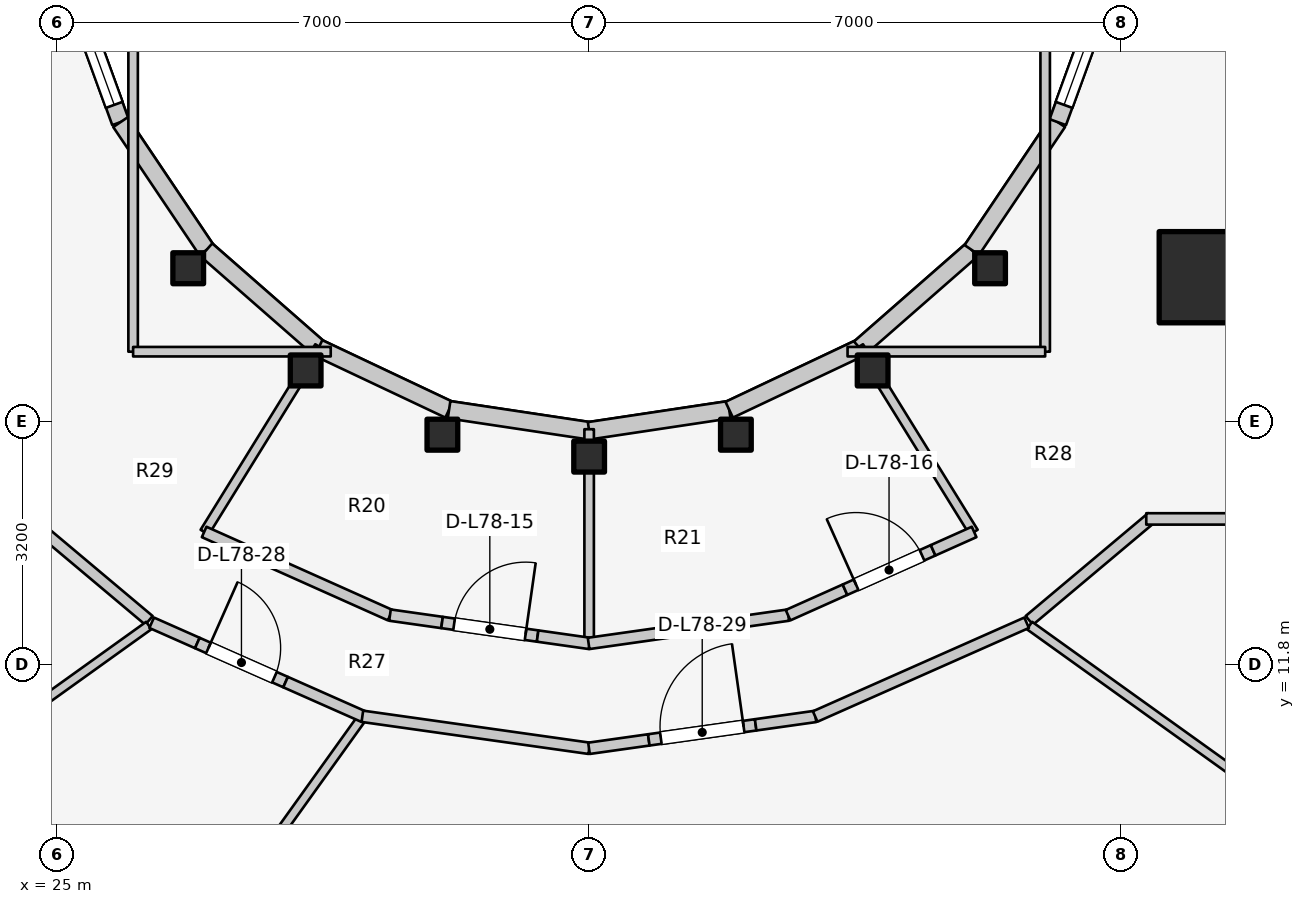
"""IFC4 building model, lengths in metres.
Left out: names, types, materials, properties, quantities, classifications, styles, units other than length and angle.
Written with IfcOpenShell. Run it as: python <this file> out.ifc"""

import sys

from ifc_helpers import new_model, si_unit, direction, frame, frame_2d, origin, origin_2d, place, context, subcontext, project, spatial, rectangle, i_section, extrude, element, fill, save


model = new_model("IFC4")
c1 = context("Model", 3, precision=1e-05, world=origin(), true_north=direction((0.0, 1.0)))
c2 = subcontext(c1, "Body", "Model", "MODEL_VIEW")
j1 = project(units=[si_unit("LENGTHUNIT", "METRE"), si_unit("PLANEANGLEUNIT", "RADIAN")], contexts=[c1])
p1 = place(None, origin())
s1 = spatial("IfcSite", under=j1, at=p1, CompositionType="ELEMENT")
p2 = place(p1, origin())
s2 = spatial("IfcBuilding", under=s1, at=p2, CompositionType="ELEMENT")
p3 = place(p2, frame((0.0, 0.0, 256.8)))
s3 = spatial("IfcBuildingStorey", under=s2, at=p3, CompositionType="ELEMENT", Elevation=256.8)
p4 = place(p3, frame((39.85, 16.55, 0.0), z_axis=(0.0, 0.0, 1.0), x_axis=(1.0, 0.0, 0.0)))
e1 = element("IfcWall", 1, at=p4, inside=s3, PredefinedType="SHEAR", context=c2, shape_type="SweptSolid", body=[
    extrude(rectangle(XDim=4.5, YDim=0.45, at=frame_2d((2.25, 0.0))), origin(), (0.0, 0.0, 1.0), 3.6),
])
p5 = place(p3, frame((40.1, 16.9, 0.0), z_axis=(0.0, 0.0, 1.0), x_axis=(1.0, 0.0, 0.0)))
e2 = element("IfcColumn", 2, at=p5, inside=s3, PredefinedType="COLUMN", context=c2, shape_type="SweptSolid", body=[
    extrude(rectangle(XDim=1.2, YDim=1.2, at=origin_2d()), origin(), (0.0, 0.0, 1.0), 3.6),
])
for number, where, z_axis, x_axis in (
    (3, (26.725, 17.018, 0.0), (0.0, 0.0, 1.0), (1.0, 0.0, 0.0)),
    (4, (28.27, 15.673, 0.0), (0.0, 0.0, 1.0), (1.0, 0.0, 0.0)),
    (5, (30.069, 14.828, 0.0), (0.0, 0.0, 1.0), (1.0, 0.0, 0.0)),
    (6, (32.0, 14.54, 0.0), (0.0, 0.0, 1.0), (1.0, 0.0, 0.0)),
    (7, (33.931, 14.828, 0.0), (0.0, 0.0, 1.0), (1.0, 0.0, 0.0)),
    (8, (35.73, 15.673, 0.0), (0.0, 0.0, 1.0), (1.0, 0.0, 0.0)),
    (9, (37.275, 17.018, 0.0), (0.0, 0.0, 1.0), (1.0, 0.0, 0.0)),
):
    element("IfcColumn", number, at=place(p3, frame(where, z_axis=z_axis, x_axis=x_axis)), inside=s3, PredefinedType="COLUMN", context=c2, shape_type="SweptSolid", body=[
        extrude(i_section(OverallWidth=0.404, OverallDepth=0.407, WebThickness=0.027, FlangeThickness=0.044, FilletRadius=0.025, at=origin_2d()), origin(), (0.0, 0.0, 1.0), 3.6),
    ])
p6 = place(p3, frame((25.123, 20.898, 0.0), z_axis=(0.0, 0.0, 1.0), x_axis=(0.341423187295, -0.93990968033, 0.0)))
e10 = element("IfcWall", 10, at=p6, inside=s3, PredefinedType="STANDARD", context=c2, shape_type="SweptSolid", body=[
    extrude(rectangle(XDim=2.084, YDim=0.23, at=frame_2d((1.042, 0.0))), origin(), (0.0, 0.0, 1.0), 3.06),
])
p7 = place(p6, frame((0.242, 0.0, 0.85)))
e11 = element("IfcOpeningElement", 11, at=p7, cuts=e10, PredefinedType="OPENING", context=c2, shape_type="SweptSolid", body=[
    extrude(rectangle(XDim=1.6, YDim=1.65, at=frame_2d((0.8, 0.825))), frame((0.0, 0.125, 0.0), z_axis=(0.0, -1.0, 0.0), x_axis=(1.0, 0.0, 0.0)), (0.0, 0.0, 1.0), 0.25),
])
p8 = place(p3, frame((25.834, 18.94, 0.0), z_axis=(0.0, 0.0, 1.0), x_axis=(0.558197800898, -0.829707909492, 0.0)))
e12 = element("IfcWall", 12, at=p8, inside=s3, PredefinedType="STANDARD", context=c2, shape_type="SweptSolid", body=[
    extrude(rectangle(XDim=2.027, YDim=0.23, at=frame_2d((1.013, 0.0))), origin(), (0.0, 0.0, 1.0), 1.72),
])
p9 = place(p3, frame((26.965, 17.258, 0.0), z_axis=(0.0, 0.0, 1.0), x_axis=(0.752576694707, -0.658504607869, 0.0)))
e13 = element("IfcWall", 13, at=p9, inside=s3, PredefinedType="STANDARD", context=c2, shape_type="SweptSolid", body=[
    extrude(rectangle(XDim=1.959, YDim=0.23, at=frame_2d((0.98, 0.0))), origin(), (0.0, 0.0, 1.0), 1.72),
])
p10 = place(p3, frame((28.44, 15.968, 0.0), z_axis=(0.0, 0.0, 1.0), x_axis=(0.904179699603, -0.427152280606, 0.0)))
e14 = element("IfcWall", 14, at=p10, inside=s3, PredefinedType="STANDARD", context=c2, shape_type="SweptSolid", body=[
    extrude(rectangle(XDim=1.899, YDim=0.23, at=frame_2d((0.95, 0.0))), origin(), (0.0, 0.0, 1.0), 1.72),
])
for number, where, z_axis, x_axis in (
    (15, (30.157, 15.157, 0.0), (0.0, 0.0, 1.0), (0.989, -0.149, 0.0)),
    (16, (32.0, 14.88, 0.0), (0.0, 0.0, 1.0), (0.989, 0.149, 0.0)),
):
    element("IfcWall", number, at=place(p3, frame(where, z_axis=z_axis, x_axis=x_axis)), inside=s3, PredefinedType="STANDARD", context=c2, shape_type="SweptSolid", body=[
        extrude(rectangle(XDim=1.864, YDim=0.23, at=frame_2d((0.932, 0.0))), origin(), (0.0, 0.0, 1.0), 1.72),
    ])
p11 = place(p3, frame((33.843, 15.157, 0.0), z_axis=(0.0, 0.0, 1.0), x_axis=(0.904179699603, 0.427152280606, 0.0)))
e17 = element("IfcWall", 17, at=p11, inside=s3, PredefinedType="STANDARD", context=c2, shape_type="SweptSolid", body=[
    extrude(rectangle(XDim=1.899, YDim=0.23, at=frame_2d((0.95, 0.0))), origin(), (0.0, 0.0, 1.0), 1.72),
])
p12 = place(p3, frame((35.56, 15.968, 0.0), z_axis=(0.0, 0.0, 1.0), x_axis=(0.752576694707, 0.658504607869, 0.0)))
e18 = element("IfcWall", 18, at=p12, inside=s3, PredefinedType="STANDARD", context=c2, shape_type="SweptSolid", body=[
    extrude(rectangle(XDim=1.959, YDim=0.23, at=frame_2d((0.98, 0.0))), origin(), (0.0, 0.0, 1.0), 1.72),
])
p13 = place(p3, frame((37.035, 17.258, 0.0), z_axis=(0.0, 0.0, 1.0), x_axis=(0.558197800898, 0.829707909492, 0.0)))
e19 = element("IfcWall", 19, at=p13, inside=s3, PredefinedType="STANDARD", context=c2, shape_type="SweptSolid", body=[
    extrude(rectangle(XDim=2.027, YDim=0.23, at=frame_2d((1.013, 0.0))), origin(), (0.0, 0.0, 1.0), 1.72),
])
p14 = place(p3, frame((38.166, 18.94, 0.0), z_axis=(0.0, 0.0, 1.0), x_axis=(0.341423187295, 0.93990968033, 0.0)))
e20 = element("IfcWall", 20, at=p14, inside=s3, PredefinedType="STANDARD", context=c2, shape_type="SweptSolid", body=[
    extrude(rectangle(XDim=2.084, YDim=0.23, at=frame_2d((1.042, 0.0))), origin(), (0.0, 0.0, 1.0), 3.06),
])
p15 = place(p14, frame((0.242, 0.0, 0.85)))
e21 = element("IfcOpeningElement", 21, at=p15, cuts=e20, PredefinedType="OPENING", context=c2, shape_type="SweptSolid", body=[
    extrude(rectangle(XDim=1.6, YDim=1.65, at=frame_2d((0.8, 0.825))), frame((0.0, 0.125, 0.0), z_axis=(0.0, -1.0, 0.0), x_axis=(1.0, 0.0, 0.0)), (0.0, 0.0, 1.0), 0.25),
])
p16 = place(p3, frame((28.45, 15.985, 0.0), z_axis=(0.0, 0.0, 1.0), x_axis=(-0.52592395012, -0.850531597702, 0.0)))
e22 = element("IfcWall", 22, at=p16, inside=s3, PredefinedType="PARTITIONING", context=c2, shape_type="SweptSolid", body=[
    extrude(rectangle(XDim=2.869, YDim=0.125, at=frame_2d((1.435, 0.0))), origin(), (0.0, 0.0, 1.0), 1.72),
])
p17 = place(p3, frame((32.0, 14.9, 0.0), z_axis=(0.0, 0.0, 1.0), x_axis=(0.0, -1.0, 0.0)))
e23 = element("IfcWall", 23, at=p17, inside=s3, PredefinedType="PARTITIONING", context=c2, shape_type="SweptSolid", body=[
    extrude(rectangle(XDim=2.818, YDim=0.125, at=frame_2d((1.409, 0.0))), origin(), (0.0, 0.0, 1.0), 1.72),
])
p18 = place(p3, frame((35.55, 15.985, 0.0), z_axis=(0.0, 0.0, 1.0), x_axis=(0.52592395012, -0.850531597702, 0.0)))
e24 = element("IfcWall", 24, at=p18, inside=s3, PredefinedType="PARTITIONING", context=c2, shape_type="SweptSolid", body=[
    extrude(rectangle(XDim=2.869, YDim=0.125, at=frame_2d((1.435, 0.0))), origin(), (0.0, 0.0, 1.0), 1.72),
])
p19 = place(p3, frame((26.935, 13.549, 0.0), z_axis=(0.0, 0.0, 1.0), x_axis=(0.912859324183, -0.408274239027, 0.0)))
e25 = element("IfcWall", 25, at=p19, inside=s3, PredefinedType="PARTITIONING", context=c2, shape_type="SweptSolid", body=[
    extrude(rectangle(XDim=2.682, YDim=0.15, at=frame_2d((1.341, 0.0))), origin(), (0.0, 0.0, 1.0), 1.72),
])
p20 = place(p3, frame((29.38, 12.455, 0.0), z_axis=(0.0, 0.0, 1.0), x_axis=(0.990090139669, -0.140433312754, 0.0)))
e26 = element("IfcWall", 26, at=p20, inside=s3, PredefinedType="PARTITIONING", context=c2, shape_type="SweptSolid", body=[
    extrude(rectangle(XDim=0.692, YDim=0.15, at=frame_2d((0.346, 0.0))), origin(), (0.0, 0.0, 1.0), 1.72),
])
p21 = place(p3, frame((30.065, 12.357, 0.0), z_axis=(0.0, 0.0, 1.0), x_axis=(0.990102710588, -0.140344656064, 0.0)))
e27 = element("IfcWall", 27, at=p21, inside=s3, PredefinedType="PARTITIONING", context=c2, shape_type="SweptSolid", body=[
    extrude(rectangle(XDim=1.27, YDim=0.15, at=frame_2d((0.635, 0.0))), origin(), (0.0, 0.0, 1.0), 3.075),
])
p22 = place(p21, frame((0.16, 0.0, 0.0)))
e28 = element("IfcOpeningElement", 28, at=p22, cuts=e27, PredefinedType="OPENING", context=c2, shape_type="SweptSolid", body=[
    extrude(rectangle(XDim=0.95, YDim=2.1, at=frame_2d((0.475, 1.05))), frame((0.0, 0.085, 0.0), z_axis=(0.0, -1.0, 0.0), x_axis=(1.0, 0.0, 0.0)), (0.0, 0.0, 1.0), 0.17),
])
p23 = place(p3, frame((31.322, 12.179, 0.0), z_axis=(0.0, 0.0, 1.0), x_axis=(0.990090139669, -0.140433312754, 0.0)))
e29 = element("IfcWall", 29, at=p23, inside=s3, PredefinedType="PARTITIONING", context=c2, shape_type="SweptSolid", body=[
    extrude(rectangle(XDim=0.692, YDim=0.15, at=frame_2d((0.346, 0.0))), origin(), (0.0, 0.0, 1.0), 1.72),
])
p24 = place(p3, frame((31.993, 12.082, 0.0), z_axis=(0.0, 0.0, 1.0), x_axis=(0.990096156252, 0.140390887794, 0.0)))
e30 = element("IfcWall", 30, at=p24, inside=s3, PredefinedType="PARTITIONING", context=c2, shape_type="SweptSolid", body=[
    extrude(rectangle(XDim=2.654, YDim=0.15, at=frame_2d((1.327, 0.0))), origin(), (0.0, 0.0, 1.0), 1.72),
])
p25 = place(p3, frame((34.617, 12.454, 0.0), z_axis=(0.0, 0.0, 1.0), x_axis=(0.912926186948, 0.408124707883, 0.0)))
e31 = element("IfcWall", 31, at=p25, inside=s3, PredefinedType="PARTITIONING", context=c2, shape_type="SweptSolid", body=[
    extrude(rectangle(XDim=0.821, YDim=0.15, at=frame_2d((0.41, 0.0))), origin(), (0.0, 0.0, 1.0), 1.72),
])
p26 = place(p3, frame((35.366, 12.789, 0.0), z_axis=(0.0, 0.0, 1.0), x_axis=(0.912825795494, 0.408349197479, 0.0)))
e32 = element("IfcWall", 32, at=p26, inside=s3, PredefinedType="PARTITIONING", context=c2, shape_type="SweptSolid", body=[
    extrude(rectangle(XDim=1.27, YDim=0.15, at=frame_2d((0.635, 0.0))), origin(), (0.0, 0.0, 1.0), 2.16),
])
p27 = place(p26, frame((0.16, 0.0, 0.0)))
e33 = element("IfcOpeningElement", 33, at=p27, cuts=e32, PredefinedType="OPENING", context=c2, shape_type="SweptSolid", body=[
    extrude(rectangle(XDim=0.95, YDim=2.1, at=frame_2d((0.475, 1.05))), frame((0.0, 0.085, 0.0), z_axis=(0.0, -1.0, 0.0), x_axis=(1.0, 0.0, 0.0)), (0.0, 0.0, 1.0), 0.17),
])
p28 = place(p3, frame((36.525, 13.307, 0.0), z_axis=(0.0, 0.0, 1.0), x_axis=(0.912838500798, 0.408320794794, 0.0)))
e34 = element("IfcWall", 34, at=p28, inside=s3, PredefinedType="PARTITIONING", context=c2, shape_type="SweptSolid", body=[
    extrude(rectangle(XDim=0.591, YDim=0.15, at=frame_2d((0.296, 0.0))), origin(), (0.0, 0.0, 1.0), 3.075),
])
p29 = place(p3, frame((26.0, 15.92, 0.0), z_axis=(0.0, 0.0, 1.0), x_axis=(0.0, 1.0, 0.0)))
e35 = element("IfcWall", 35, at=p29, inside=s3, PredefinedType="PARTITIONING", context=c2, shape_type="SweptSolid", body=[
    extrude(rectangle(XDim=4.28, YDim=0.125, at=frame_2d((2.14, 0.0))), origin(), (0.0, 0.0, 1.0), 1.72),
])
p30 = place(p3, frame((26.0, 15.92, 0.0), z_axis=(0.0, 0.0, 1.0), x_axis=(1.0, 0.0, 0.0)))
e36 = element("IfcWall", 36, at=p30, inside=s3, PredefinedType="PARTITIONING", context=c2, shape_type="SweptSolid", body=[
    extrude(rectangle(XDim=2.6, YDim=0.125, at=frame_2d((1.3, 0.0))), origin(), (0.0, 0.0, 1.0), 1.72),
])
p31 = place(p3, frame((38.0, 15.92, 0.0), z_axis=(0.0, 0.0, 1.0), x_axis=(0.0, 1.0, 0.0)))
e37 = element("IfcWall", 37, at=p31, inside=s3, PredefinedType="PARTITIONING", context=c2, shape_type="SweptSolid", body=[
    extrude(rectangle(XDim=4.28, YDim=0.125, at=frame_2d((2.14, 0.0))), origin(), (0.0, 0.0, 1.0), 1.72),
])
p32 = place(p3, frame((35.4, 15.92, 0.0), z_axis=(0.0, 0.0, 1.0), x_axis=(1.0, 0.0, 0.0)))
e38 = element("IfcWall", 38, at=p32, inside=s3, PredefinedType="PARTITIONING", context=c2, shape_type="SweptSolid", body=[
    extrude(rectangle(XDim=2.6, YDim=0.125, at=frame_2d((1.3, 0.0))), origin(), (0.0, 0.0, 1.0), 1.72),
])
for number, where, z_axis, x_axis in (
    (39, (26.209, 12.385, 0.0), (0.0, 0.0, 1.0), (-0.766, 0.643, 0.0)),
    (40, (37.791, 12.385, 0.0), (0.0, 0.0, 1.0), (0.766, 0.643, 0.0)),
):
    element("IfcWall", number, at=place(p3, frame(where, z_axis=z_axis, x_axis=x_axis)), inside=s3, PredefinedType="PARTITIONING", context=c2, shape_type="SweptSolid", body=[
        extrude(rectangle(XDim=2.105, YDim=0.15, at=frame_2d((1.053, 0.0))), origin(), (0.0, 0.0, 1.0), 1.72),
    ])
p33 = place(p3, frame((39.33, 13.72, 0.0), z_axis=(0.0, 0.0, 1.0), x_axis=(1.0, 0.0, 0.0)))
e41 = element("IfcWall", 41, at=p33, inside=s3, PredefinedType="PARTITIONING", context=c2, shape_type="SweptSolid", body=[
    extrude(rectangle(XDim=5.06, YDim=0.15, at=frame_2d((2.53, 0.0))), origin(), (0.0, 0.0, 1.0), 1.72),
])
p34 = place(p3, frame((26.206, 12.318, 0.0), z_axis=(0.0, 0.0, 1.0), x_axis=(-0.812763742602, -0.582593424879, 0.0)))
e42 = element("IfcWall", 42, at=p34, inside=s3, PredefinedType="MOVABLE", context=c2, shape_type="SweptSolid", body=[
    extrude(rectangle(XDim=6.966, YDim=0.12, at=frame_2d((3.483, 0.0))), origin(), (0.0, 0.0, 1.0), 1.72),
])
p35 = place(p3, frame((28.992, 11.076, 0.0), z_axis=(0.0, 0.0, 1.0), x_axis=(-0.582726066442, -0.812668648029, 0.0)))
e43 = element("IfcWall", 43, at=p35, inside=s3, PredefinedType="MOVABLE", context=c2, shape_type="SweptSolid", body=[
    extrude(rectangle(XDim=6.515, YDim=0.12, at=frame_2d((3.257, 0.0))), origin(), (0.0, 0.0, 1.0), 1.72),
])
p36 = place(p3, frame((37.794, 12.318, 0.0), z_axis=(0.0, 0.0, 1.0), x_axis=(0.812763742602, -0.582593424879, 0.0)))
e44 = element("IfcWall", 44, at=p36, inside=s3, PredefinedType="MOVABLE", context=c2, shape_type="SweptSolid", body=[
    extrude(rectangle(XDim=6.966, YDim=0.12, at=frame_2d((3.483, 0.0))), origin(), (0.0, 0.0, 1.0), 1.72),
])
p37 = place(p3, frame((26.244, 12.354, 0.0), z_axis=(0.0, 0.0, 1.0), x_axis=(0.914255086823, -0.405139033194, 0.0)))
e45 = element("IfcWall", 45, at=p37, inside=s3, PredefinedType="PARTITIONING", context=c2, shape_type="SweptSolid", body=[
    extrude(rectangle(XDim=0.657, YDim=0.15, at=frame_2d((0.329, 0.0))), origin(), (0.0, 0.0, 1.0), 3.075),
])
p38 = place(p3, frame((26.845, 12.088, 0.0), z_axis=(0.0, 0.0, 1.0), x_axis=(0.914294474207, -0.405050138174, 0.0)))
e46 = element("IfcWall", 46, at=p38, inside=s3, PredefinedType="PARTITIONING", context=c2, shape_type="SweptSolid", body=[
    extrude(rectangle(XDim=1.27, YDim=0.15, at=frame_2d((0.635, 0.0))), origin(), (0.0, 0.0, 1.0), 2.16),
])
p39 = place(p38, frame((0.16, 0.0, 0.0)))
e47 = element("IfcOpeningElement", 47, at=p39, cuts=e46, PredefinedType="OPENING", context=c2, shape_type="SweptSolid", body=[
    extrude(rectangle(XDim=0.95, YDim=2.1, at=frame_2d((0.475, 1.05))), frame((0.0, 0.085, 0.0), z_axis=(0.0, -1.0, 0.0), x_axis=(1.0, 0.0, 0.0)), (0.0, 0.0, 1.0), 0.17),
])
p40 = place(p3, frame((28.006, 11.573, 0.0), z_axis=(0.0, 0.0, 1.0), x_axis=(0.914340182122, -0.404946948817, 0.0)))
e48 = element("IfcWall", 48, at=p40, inside=s3, PredefinedType="PARTITIONING", context=c2, shape_type="SweptSolid", body=[
    extrude(rectangle(XDim=1.122, YDim=0.15, at=frame_2d((0.561, 0.0))), origin(), (0.0, 0.0, 1.0), 1.72),
])
p41 = place(p3, frame((29.016, 11.123, 0.0), z_axis=(0.0, 0.0, 1.0), x_axis=(0.990186143936, -0.139754786527, 0.0)))
e49 = element("IfcWall", 49, at=p41, inside=s3, PredefinedType="PARTITIONING", context=c2, shape_type="SweptSolid", body=[
    extrude(rectangle(XDim=3.015, YDim=0.15, at=frame_2d((1.508, 0.0))), origin(), (0.0, 0.0, 1.0), 1.72),
])
p42 = place(p3, frame((31.998, 10.702, 0.0), z_axis=(0.0, 0.0, 1.0), x_axis=(0.990224114478, 0.139485494252, 0.0)))
e50 = element("IfcWall", 50, at=p42, inside=s3, PredefinedType="PARTITIONING", context=c2, shape_type="SweptSolid", body=[
    extrude(rectangle(XDim=0.795, YDim=0.15, at=frame_2d((0.397, 0.0))), origin(), (0.0, 0.0, 1.0), 1.72),
])
p43 = place(p3, frame((32.785, 10.813, 0.0), z_axis=(0.0, 0.0, 1.0), x_axis=(0.990229514994, 0.139447149967, 0.0)))
e51 = element("IfcWall", 51, at=p43, inside=s3, PredefinedType="PARTITIONING", context=c2, shape_type="SweptSolid", body=[
    extrude(rectangle(XDim=1.42, YDim=0.15, at=frame_2d((0.71, 0.0))), origin(), (0.0, 0.0, 1.0), 3.075),
])
p44 = place(p43, frame((0.16, 0.0, 0.0)))
e52 = element("IfcOpeningElement", 52, at=p44, cuts=e51, PredefinedType="OPENING", context=c2, shape_type="SweptSolid", body=[
    extrude(rectangle(XDim=1.1, YDim=2.1, at=frame_2d((0.55, 1.05))), frame((0.0, 0.085, 0.0), z_axis=(0.0, -1.0, 0.0), x_axis=(1.0, 0.0, 0.0)), (0.0, 0.0, 1.0), 0.17),
])
p45 = place(p3, frame((34.191, 11.011, 0.0), z_axis=(0.0, 0.0, 1.0), x_axis=(0.990224114478, 0.139485494252, 0.0)))
e53 = element("IfcWall", 53, at=p45, inside=s3, PredefinedType="PARTITIONING", context=c2, shape_type="SweptSolid", body=[
    extrude(rectangle(XDim=0.795, YDim=0.15, at=frame_2d((0.397, 0.0))), origin(), (0.0, 0.0, 1.0), 3.075),
])
p46 = place(p3, frame((34.974, 11.121, 0.0), z_axis=(0.0, 0.0, 1.0), x_axis=(0.914181699255, 0.405304602425, 0.0)))
e54 = element("IfcWall", 54, at=p46, inside=s3, PredefinedType="PARTITIONING", context=c2, shape_type="SweptSolid", body=[
    extrude(rectangle(XDim=3.043, YDim=0.15, at=frame_2d((1.521, 0.0))), origin(), (0.0, 0.0, 1.0), 1.72),
])
p47 = place(p7, origin())
e55 = element("IfcWindow", 55, at=p47, inside=s3, PartitioningType="SINGLE_PANEL", PredefinedType="WINDOW", context=c2, shape_type="SweptSolid", body=[
    extrude(rectangle(XDim=1.6, YDim=1.65, at=frame_2d((0.8, 0.825))), frame((0.0, 0.03, 0.0), z_axis=(0.0, -1.0, 0.0), x_axis=(1.0, 0.0, 0.0)), (0.0, 0.0, 1.0), 0.06),
])
fill(e11, e55)
p48 = place(p15, origin())
e56 = element("IfcWindow", 56, at=p48, inside=s3, PartitioningType="SINGLE_PANEL", PredefinedType="WINDOW", context=c2, shape_type="SweptSolid", body=[
    extrude(rectangle(XDim=1.6, YDim=1.65, at=frame_2d((0.8, 0.825))), frame((0.0, 0.03, 0.0), z_axis=(0.0, -1.0, 0.0), x_axis=(1.0, 0.0, 0.0)), (0.0, 0.0, 1.0), 0.06),
])
fill(e21, e56)
p49 = place(p22, origin())
e57 = element("IfcDoor", 57, at=p49, inside=s3, OperationType="SINGLE_SWING_RIGHT", PredefinedType="DOOR", context=c2, shape_type="SweptSolid", body=[
    extrude(rectangle(XDim=0.95, YDim=2.1, at=frame_2d((0.475, 1.05))), frame((0.0, 0.025, 0.0), z_axis=(0.0, -1.0, 0.0), x_axis=(1.0, 0.0, 0.0)), (0.0, 0.0, 1.0), 0.05),
])
fill(e28, e57)
p50 = place(p27, origin())
e58 = element("IfcDoor", 58, at=p50, inside=s3, OperationType="SINGLE_SWING_LEFT", PredefinedType="DOOR", context=c2, shape_type="SweptSolid", body=[
    extrude(rectangle(XDim=0.95, YDim=2.1, at=frame_2d((0.475, 1.05))), frame((0.0, 0.025, 0.0), z_axis=(0.0, -1.0, 0.0), x_axis=(1.0, 0.0, 0.0)), (0.0, 0.0, 1.0), 0.05),
])
fill(e33, e58)
p51 = place(p39, origin())
e59 = element("IfcDoor", 59, at=p51, inside=s3, OperationType="SINGLE_SWING_LEFT", PredefinedType="DOOR", context=c2, shape_type="SweptSolid", body=[
    extrude(rectangle(XDim=0.95, YDim=2.1, at=frame_2d((0.475, 1.05))), frame((0.0, 0.025, 0.0), z_axis=(0.0, -1.0, 0.0), x_axis=(1.0, 0.0, 0.0)), (0.0, 0.0, 1.0), 0.05),
])
fill(e47, e59)
p52 = place(p44, origin())
e60 = element("IfcDoor", 60, at=p52, inside=s3, OperationType="SINGLE_SWING_RIGHT", PredefinedType="DOOR", context=c2, shape_type="SweptSolid", body=[
    extrude(rectangle(XDim=1.1, YDim=2.1, at=frame_2d((0.55, 1.05))), frame((0.0, 0.025, 0.0), z_axis=(0.0, -1.0, 0.0), x_axis=(1.0, 0.0, 0.0)), (0.0, 0.0, 1.0), 0.05),
])
fill(e52, e60)
save(model, sys.argv[1])
